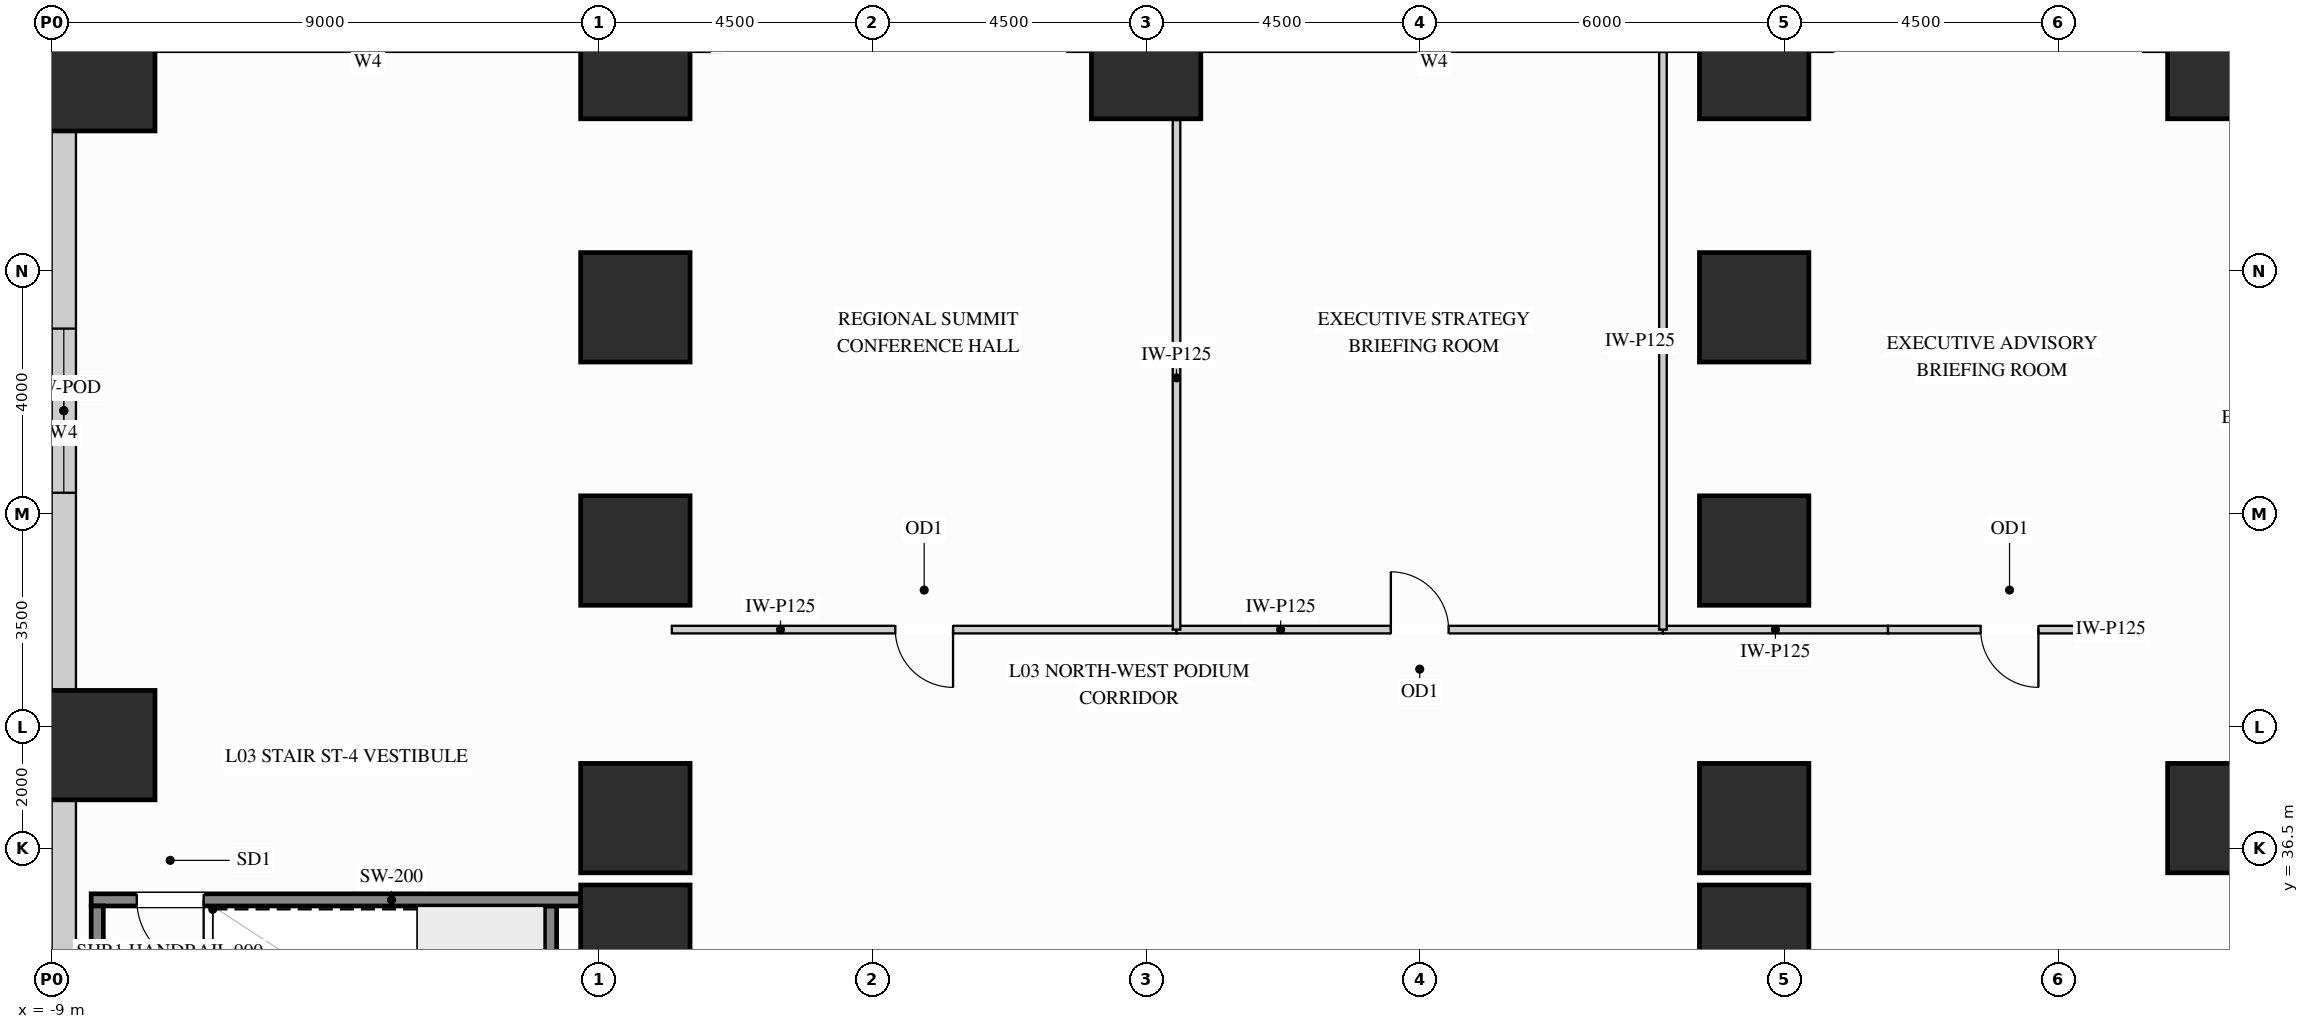
"""IFC4 building model, lengths in metres.
Left out: names, types, materials, properties, quantities, classifications, styles, units other than length and angle.
Written with IfcOpenShell. Run it as: python <this file> out.ifc"""

import sys

from ifc_helpers import new_model, si_unit, direction, frame, frame_2d, origin, origin_2d, place, context, subcontext, project, spatial, rectangle, extrude, source, transform, mapped, element, fill, save


model = new_model("IFC4")
c1 = context("Model", 3, precision=1e-05, world=origin(), true_north=direction((0.0, 1.0)))
c2 = subcontext(c1, "Body", "Model", "MODEL_VIEW")
j1 = project(units=[si_unit("LENGTHUNIT", "METRE"), si_unit("PLANEANGLEUNIT", "RADIAN")], contexts=[c1])
p1 = place(None, origin())
s1 = spatial("IfcSite", under=j1, at=p1, CompositionType="ELEMENT")
p2 = place(p1, origin())
s2 = spatial("IfcBuilding", under=s1, at=p2, CompositionType="ELEMENT")
p3 = place(p2, frame((0.0, 0.0, 13.5)))
s3 = spatial("IfcBuildingStorey", under=s2, at=p3, CompositionType="ELEMENT", Elevation=13.5)
m1 = source(origin(), c2, "Body", "SweptSolid", [
    extrude(rectangle(XDim=1.8, YDim=1.8, at=origin_2d()), origin(), (0.0, 0.0, 1.0), 4.15),
])
for number, where, z_axis, x_axis in (
    (1, (-8.2, 38.2, 0.0), (0.0, 0.0, 1.0), (1.0, 0.0, 0.0)),
    (2, (-8.2, 49.2, 0.0), (0.0, 0.0, 1.0), (1.0, 0.0, 0.0)),
    (3, (0.6, 35.0, 0.0), (0.0, 0.0, 1.0), (1.0, 0.0, 0.0)),
    (4, (0.6, 37.0, 0.0), (0.0, 0.0, 1.0), (1.0, 0.0, 0.0)),
    (5, (0.6, 41.4, 0.0), (0.0, 0.0, 1.0), (1.0, 0.0, 0.0)),
    (6, (0.6, 45.4, 0.0), (0.0, 0.0, 1.0), (1.0, 0.0, 0.0)),
    (7, (0.6, 49.4, 0.0), (0.0, 0.0, 1.0), (1.0, 0.0, 0.0)),
    (8, (9.0, 49.4, 0.0), (0.0, 0.0, 1.0), (1.0, 0.0, 0.0)),
    (9, (19.0, 49.4, 0.0), (0.0, 0.0, 1.0), (1.0, 0.0, 0.0)),
    (10, (26.7, 49.4, 0.0), (0.0, 0.0, 1.0), (1.0, 0.0, 0.0)),
    (11, (26.7, 37.0, 0.0), (0.0, 0.0, 1.0), (1.0, 0.0, 0.0)),
    (12, (19.0, 35.0, 0.0), (0.0, 0.0, 1.0), (1.0, 0.0, 0.0)),
    (13, (19.0, 37.0, 0.0), (0.0, 0.0, 1.0), (1.0, 0.0, 0.0)),
    (14, (19.0, 41.4, 0.0), (0.0, 0.0, 1.0), (1.0, 0.0, 0.0)),
    (15, (19.0, 45.4, 0.0), (0.0, 0.0, 1.0), (1.0, 0.0, 0.0)),
):
    element("IfcColumn", number, at=place(p3, frame(where, z_axis=z_axis, x_axis=x_axis)), inside=s3, PredefinedType="COLUMN", context=c2, shape_type="MappedRepresentation", body=[
        mapped(m1, transform((0.0, 0.0, 0.0), x_axis=(1.0, 0.0, 0.0), y_axis=(0.0, 1.0, 0.0), z_axis=(0.0, 0.0, 1.0))),
    ])
p4 = place(p3, frame((-8.8, 48.302, 0.0), z_axis=(0.0, 0.0, 1.0), x_axis=(0.0, -1.0, 0.0)))
e16 = element("IfcWall", 16, at=p4, inside=s3, PredefinedType="SOLIDWALL", context=c2, shape_type="SweptSolid", body=[
    extrude(rectangle(XDim=9.204, YDim=0.4, at=frame_2d((4.602, 0.0))), origin(), (0.0, 0.0, 1.0), 3.085),
])
p5 = place(p4, frame((3.252, 0.0, 0.65)))
e17 = element("IfcOpeningElement", 17, at=p5, cuts=e16, PredefinedType="OPENING", context=c2, shape_type="SweptSolid", body=[
    extrude(rectangle(XDim=2.7, YDim=2.255, at=frame_2d((1.35, 1.127))), frame((0.0, 0.21, 0.0), z_axis=(0.0, -1.0, 0.0), x_axis=(1.0, 0.0, 0.0)), (0.0, 0.0, 1.0), 0.42),
])
p6 = place(p3, frame((-8.8, 37.302, 0.0), z_axis=(0.0, 0.0, 1.0), x_axis=(0.0, -1.0, 0.0)))
e18 = element("IfcWall", 18, at=p6, inside=s3, PredefinedType="SOLIDWALL", context=c2, shape_type="SweptSolid", body=[
    extrude(rectangle(XDim=9.604, YDim=0.4, at=frame_2d((4.802, 0.0))), origin(), (0.0, 0.0, 1.0), 3.085),
])
p7 = place(p6, frame((3.452, 0.0, 0.65)))
e19 = element("IfcOpeningElement", 19, at=p7, cuts=e18, PredefinedType="OPENING", context=c2, shape_type="SweptSolid", body=[
    extrude(rectangle(XDim=2.7, YDim=2.255, at=frame_2d((1.35, 1.127))), frame((0.0, 0.21, 0.0), z_axis=(0.0, -1.0, 0.0), x_axis=(1.0, 0.0, 0.0)), (0.0, 0.0, 1.0), 0.42),
])
p8 = place(p3, frame((1.2, 40.1, 0.0), z_axis=(0.0, 0.0, 1.0), x_axis=(1.0, 0.0, 0.0)))
e20 = element("IfcWall", 20, at=p8, inside=s3, PredefinedType="PARTITIONING", context=c2, shape_type="SweptSolid", body=[
    extrude(rectangle(XDim=8.3, YDim=0.125, at=frame_2d((4.15, 0.0))), origin(), (0.0, 0.0, 1.0), 3.586),
])
p9 = place(p8, frame((3.675, 0.0, 0.0)))
e21 = element("IfcOpeningElement", 21, at=p9, cuts=e20, PredefinedType="OPENING", context=c2, shape_type="SweptSolid", body=[
    extrude(rectangle(XDim=0.95, YDim=2.15, at=frame_2d((0.475, 1.075))), frame((0.0, 0.073, 0.0), z_axis=(0.0, -1.0, 0.0), x_axis=(1.0, 0.0, 0.0)), (0.0, 0.0, 1.0), 0.145),
])
p10 = place(p3, frame((9.5, 40.1, 0.0), z_axis=(0.0, 0.0, 1.0), x_axis=(1.0, 0.0, 0.0)))
e22 = element("IfcWall", 22, at=p10, inside=s3, PredefinedType="PARTITIONING", context=c2, shape_type="SweptSolid", body=[
    extrude(rectangle(XDim=8.0, YDim=0.125, at=frame_2d((4.0, 0.0))), origin(), (0.0, 0.0, 1.0), 3.586),
])
p11 = place(p10, frame((3.525, 0.0, 0.0)))
e23 = element("IfcOpeningElement", 23, at=p11, cuts=e22, PredefinedType="OPENING", context=c2, shape_type="SweptSolid", body=[
    extrude(rectangle(XDim=0.95, YDim=2.15, at=frame_2d((0.475, 1.075))), frame((0.0, 0.073, 0.0), z_axis=(0.0, -1.0, 0.0), x_axis=(1.0, 0.0, 0.0)), (0.0, 0.0, 1.0), 0.145),
])
p12 = place(p3, frame((21.2, 40.1, 0.0), z_axis=(0.0, 0.0, 1.0), x_axis=(1.0, 0.0, 0.0)))
e24 = element("IfcWall", 24, at=p12, inside=s3, PredefinedType="PARTITIONING", context=c2, shape_type="SweptSolid", body=[
    extrude(rectangle(XDim=4.0, YDim=0.125, at=frame_2d((2.0, 0.0))), origin(), (0.0, 0.0, 1.0), 4.135),
])
p13 = place(p12, frame((1.525, 0.0, 0.0)))
e25 = element("IfcOpeningElement", 25, at=p13, cuts=e24, PredefinedType="OPENING", context=c2, shape_type="SweptSolid", body=[
    extrude(rectangle(XDim=0.95, YDim=2.15, at=frame_2d((0.475, 1.075))), frame((0.0, 0.073, 0.0), z_axis=(0.0, -1.0, 0.0), x_axis=(1.0, 0.0, 0.0)), (0.0, 0.0, 1.0), 0.145),
])
m2 = source(origin(), c2, "Body", "SweptSolid", [
    extrude(rectangle(XDim=3.7, YDim=0.125, at=frame_2d((1.85, 0.0))), origin(), (0.0, 0.0, 1.0), 3.586),
])
p14 = place(p3, frame((17.5, 40.1, 0.0), z_axis=(0.0, 0.0, 1.0), x_axis=(1.0, 0.0, 0.0)))
e26 = element("IfcWall", 26, at=p14, inside=s3, PredefinedType="PARTITIONING", context=c2, shape_type="MappedRepresentation", body=[
    mapped(m2, transform((0.0, 0.0, 0.0), x_axis=(1.0, 0.0, 0.0), y_axis=(0.0, 1.0, 0.0), z_axis=(0.0, 0.0, 1.0))),
])
m3 = source(origin(), c2, "Body", "SweptSolid", [
    extrude(rectangle(XDim=8.38, YDim=0.125, at=frame_2d((4.19, 0.0))), origin(), (0.0, 0.0, 1.0), 4.135),
])
p15 = place(p3, frame((9.5, 40.1, 0.0), z_axis=(0.0, 0.0, 1.0), x_axis=(0.0, 1.0, 0.0)))
e27 = element("IfcWall", 27, at=p15, inside=s3, PredefinedType="PARTITIONING", context=c2, shape_type="MappedRepresentation", body=[
    mapped(m3, transform((0.0, 0.0, 0.0), x_axis=(1.0, 0.0, 0.0), y_axis=(0.0, 1.0, 0.0), z_axis=(0.0, 0.0, 1.0))),
])
m4 = source(origin(), c2, "Body", "SweptSolid", [
    extrude(rectangle(XDim=9.498, YDim=0.125, at=frame_2d((4.749, 0.0))), origin(), (0.0, 0.0, 1.0), 4.135),
])
p16 = place(p3, frame((17.5, 40.1, 0.0), z_axis=(0.0, 0.0, 1.0), x_axis=(0.0, 1.0, 0.0)))
e28 = element("IfcWall", 28, at=p16, inside=s3, PredefinedType="PARTITIONING", context=c2, shape_type="MappedRepresentation", body=[
    mapped(m4, transform((0.0, 0.0, 0.0), x_axis=(1.0, 0.0, 0.0), y_axis=(0.0, 1.0, 0.0), z_axis=(0.0, 0.0, 1.0))),
])
m5 = source(origin(), c2, "Body", "SweptSolid", [
    extrude(rectangle(XDim=3.56, YDim=0.2, at=frame_2d((1.78, 0.0))), origin(), (0.0, 0.0, 1.0), 4.15),
])
p17 = place(p3, frame((-0.795, 31.995, 0.0), z_axis=(0.0, 0.0, 1.0), x_axis=(0.0, 1.0, 0.0)))
e29 = element("IfcWall", 29, at=p17, inside=s3, PredefinedType="SHEAR", context=c2, shape_type="MappedRepresentation", body=[
    mapped(m5, transform((0.0, 0.0, 0.0), x_axis=(1.0, 0.0, 0.0), y_axis=(0.0, 1.0, 0.0), z_axis=(0.0, 0.0, 1.0))),
])
p18 = place(p3, frame((-8.35, 35.655, 0.0), z_axis=(0.0, 0.0, 1.0), x_axis=(1.0, 0.0, 0.0)))
e30 = element("IfcWall", 30, at=p18, inside=s3, PredefinedType="SHEAR", context=c2, shape_type="SweptSolid", body=[
    extrude(rectangle(XDim=8.05, YDim=0.2, at=frame_2d((4.025, 0.0))), origin(), (0.0, 0.0, 1.0), 4.15),
])
p19 = place(p18, frame((0.75, 0.0, 0.0)))
e31 = element("IfcOpeningElement", 31, at=p19, cuts=e30, PredefinedType="OPENING", context=c2, shape_type="SweptSolid", body=[
    extrude(rectangle(XDim=1.1, YDim=2.15, at=frame_2d((0.55, 1.075))), frame((0.0, 0.11, 0.0), z_axis=(0.0, -1.0, 0.0), x_axis=(1.0, 0.0, 0.0)), (0.0, 0.0, 1.0), 0.22),
])
p20 = place(p3, frame((-8.25, 31.995, 0.0), z_axis=(0.0, 0.0, 1.0), x_axis=(0.0, 1.0, 0.0)))
e32 = element("IfcWall", 32, at=p20, inside=s3, PredefinedType="SHEAR", context=c2, shape_type="MappedRepresentation", body=[
    mapped(m5, transform((0.0, 0.0, 0.0), x_axis=(1.0, 0.0, 0.0), y_axis=(0.0, 1.0, 0.0), z_axis=(0.0, 0.0, 1.0))),
])
m6 = source(origin(), c2, "Body", "SweptSolid", [
    extrude(rectangle(XDim=0.95, YDim=2.15, at=frame_2d((0.475, 1.075))), frame((0.0, 0.025, 0.0), z_axis=(0.0, -1.0, 0.0), x_axis=(1.0, 0.0, 0.0)), (0.0, 0.0, 1.0), 0.05),
])
p21 = place(p9, origin())
e33 = element("IfcDoor", 33, at=p21, inside=s3, OperationType="SINGLE_SWING_RIGHT", PredefinedType="DOOR", context=c2, shape_type="MappedRepresentation", body=[
    mapped(m6, transform((0.0, 0.0, 0.0), x_axis=(1.0, 0.0, 0.0), y_axis=(0.0, 1.0, 0.0), z_axis=(0.0, 0.0, 1.0))),
])
fill(e21, e33)
p22 = place(p11, origin())
e34 = element("IfcDoor", 34, at=p22, inside=s3, OperationType="SINGLE_SWING_LEFT", PredefinedType="DOOR", context=c2, shape_type="MappedRepresentation", body=[
    mapped(m6, transform((0.0, 0.0, 0.0), x_axis=(1.0, 0.0, 0.0), y_axis=(0.0, 1.0, 0.0), z_axis=(0.0, 0.0, 1.0))),
])
fill(e23, e34)
p23 = place(p13, origin())
e35 = element("IfcDoor", 35, at=p23, inside=s3, OperationType="SINGLE_SWING_RIGHT", PredefinedType="DOOR", context=c2, shape_type="MappedRepresentation", body=[
    mapped(m6, transform((0.0, 0.0, 0.0), x_axis=(1.0, 0.0, 0.0), y_axis=(0.0, 1.0, 0.0), z_axis=(0.0, 0.0, 1.0))),
])
fill(e25, e35)
m7 = source(origin(), c2, "Body", "SweptSolid", [
    extrude(rectangle(XDim=1.1, YDim=2.15, at=frame_2d((0.55, 1.075))), frame((0.0, 0.025, 0.0), z_axis=(0.0, -1.0, 0.0), x_axis=(1.0, 0.0, 0.0)), (0.0, 0.0, 1.0), 0.05),
])
p24 = place(p19, origin())
e36 = element("IfcDoor", 36, at=p24, inside=s3, OperationType="SINGLE_SWING_RIGHT", PredefinedType="DOOR", context=c2, shape_type="MappedRepresentation", body=[
    mapped(m7, transform((0.0, 0.0, 0.0), x_axis=(1.0, 0.0, 0.0), y_axis=(0.0, 1.0, 0.0), z_axis=(0.0, 0.0, 1.0))),
])
fill(e31, e36)
m8 = source(origin(), c2, "Body", "SweptSolid", [
    extrude(rectangle(XDim=2.7, YDim=2.255, at=frame_2d((1.35, 1.127))), frame((0.0, 0.03, 0.0), z_axis=(0.0, -1.0, 0.0), x_axis=(1.0, 0.0, 0.0)), (0.0, 0.0, 1.0), 0.06),
])
p25 = place(p5, origin())
e37 = element("IfcWindow", 37, at=p25, inside=s3, PartitioningType="SINGLE_PANEL", PredefinedType="WINDOW", context=c2, shape_type="MappedRepresentation", body=[
    mapped(m8, transform((0.0, 0.0, 0.0), x_axis=(1.0, 0.0, 0.0), y_axis=(0.0, 1.0, 0.0), z_axis=(0.0, 0.0, 1.0))),
])
fill(e17, e37)
save(model, sys.argv[1])
